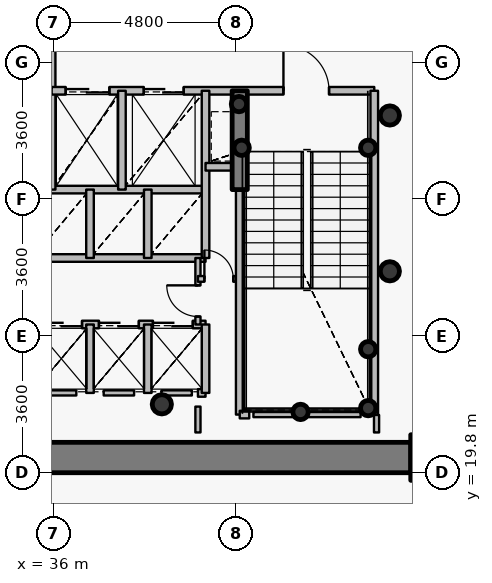
"""IFC4 building model, lengths in metres.
Left out: names, types, materials, properties, quantities, classifications, styles, units other than length and angle.
Written with IfcOpenShell. Run it as: python <this file> out.ifc"""

import sys

from ifc_helpers import new_model, si_unit, direction, frame, frame_2d, origin, origin_2d, place, context, subcontext, project, spatial, rectangle, hollow_circle, extrude, source, transform, mapped, element, fill, save


model = new_model("IFC4")
c1 = context("Model", 3, precision=1e-05, world=origin(), true_north=direction((0.0, 1.0)))
c2 = subcontext(c1, "Body", "Model", "MODEL_VIEW")
j1 = project(units=[si_unit("LENGTHUNIT", "METRE"), si_unit("PLANEANGLEUNIT", "RADIAN")], contexts=[c1])
p1 = place(None, origin())
s1 = spatial("IfcSite", under=j1, at=p1, CompositionType="ELEMENT")
p2 = place(p1, origin())
s2 = spatial("IfcBuilding", under=s1, at=p2, CompositionType="ELEMENT")
p3 = place(p2, frame((0.0, 0.0, 100.95)))
s3 = spatial("IfcBuildingStorey", under=s2, at=p3, CompositionType="ELEMENT", Elevation=100.95)
p4 = place(p3, frame((46.0, 20.2, 0.0), z_axis=(0.0, 0.0, 1.0), x_axis=(1.0, 0.0, 0.0)))
e1 = element("IfcColumn", 1, at=p4, inside=s3, PredefinedType="COLUMN", context=c2, shape_type="SweptSolid", body=[
    extrude(rectangle(XDim=1.2, YDim=1.2, at=origin_2d()), origin(), (0.0, 0.0, 1.0), 3.75),
])
p5 = place(p3, frame((38.85, 21.6, 0.0), z_axis=(0.0, 0.0, 1.0), x_axis=(1.0, 0.0, 0.0)))
e2 = element("IfcColumn", 2, at=p5, inside=s3, PredefinedType="COLUMN", context=c2, shape_type="SweptSolid", body=[
    extrude(hollow_circle(Radius=0.254, WallThickness=0.02, at=origin_2d()), origin(), (0.0, 0.0, 1.0), 3.75),
])
for number, where, z_axis, x_axis in (
    (3, (44.28, 21.5, 0.0), (0.0, 0.0, 1.0), (1.0, 0.0, 0.0)),
    (4, (44.28, 23.05, 0.0), (0.0, 0.0, 1.0), (1.0, 0.0, 0.0)),
    (5, (42.5, 21.4, 0.0), (0.0, 0.0, 1.0), (1.0, 0.0, 0.0)),
    (6, (40.95, 28.35, 0.0), (0.0, 0.0, 1.0), (1.0, 0.0, 0.0)),
    (7, (44.28, 28.35, 0.0), (0.0, 0.0, 1.0), (1.0, 0.0, 0.0)),
    (8, (40.88, 29.5, 0.0), (0.0, 0.0, 1.0), (1.0, 0.0, 0.0)),
):
    element("IfcColumn", number, at=place(p3, frame(where, z_axis=z_axis, x_axis=x_axis)), inside=s3, PredefinedType="COLUMN", context=c2, shape_type="SweptSolid", body=[
        extrude(hollow_circle(Radius=0.203, WallThickness=0.016, at=origin_2d()), origin(), (0.0, 0.0, 1.0), 3.75),
    ])
p6 = place(p3, frame((45.4, 20.2, 0.0), z_axis=(0.0, 0.0, 1.0), x_axis=(-1.0, 0.0, 0.0)))
e9 = element("IfcWall", 9, at=p6, inside=s3, PredefinedType="SHEAR", context=c2, shape_type="SweptSolid", body=[
    extrude(rectangle(XDim=18.8, YDim=0.8, at=frame_2d((9.4, 0.0))), origin(), (0.0, 0.0, 1.0), 2.95),
])
p7 = place(p6, frame((10.15, 0.0, 0.0)))
e10 = element("IfcOpeningElement", 10, at=p7, cuts=e9, PredefinedType="OPENING", context=c2, shape_type="SweptSolid", body=[
    extrude(rectangle(XDim=1.15, YDim=2.15, at=origin_2d()), frame((0.575, 0.41, 1.075), z_axis=(0.0, -1.0, 0.0), x_axis=(1.0, 0.0, 0.0)), (0.0, 0.0, 1.0), 0.82),
])
p8 = place(p3, frame((40.9, 27.25, 0.0), z_axis=(0.0, 0.0, 1.0), x_axis=(0.0, 1.0, 0.0)))
e11 = element("IfcWall", 11, at=p8, inside=s3, PredefinedType="SHEAR", context=c2, shape_type="SweptSolid", body=[
    extrude(rectangle(XDim=2.6, YDim=0.4, at=frame_2d((1.3, 0.0))), origin(), (0.0, 0.0, 1.0), 3.1),
])
for number, where, z_axis, x_axis in (
    (12, (44.85, 25.1, 0.0), (0.0, 0.0, 1.0), (1.0, 0.0, 0.0)),
    (13, (44.85, 29.2, 0.0), (0.0, 0.0, 1.0), (1.0, 0.0, 0.0)),
):
    element("IfcColumn", number, at=place(p3, frame(where, z_axis=z_axis, x_axis=x_axis)), inside=s3, PredefinedType="COLUMN", context=c2, shape_type="SweptSolid", body=[
        extrude(hollow_circle(Radius=0.254, WallThickness=0.02, at=origin_2d()), origin(), (0.0, 0.0, 1.0), 3.75),
    ])
p9 = place(p3, frame((35.05, 27.25, 0.0), z_axis=(0.0, 0.0, 1.0), x_axis=(1.0, 0.0, 0.0)))
e14 = element("IfcWall", 14, at=p9, inside=s3, PredefinedType="PARTITIONING", context=c2, shape_type="SweptSolid", body=[
    extrude(rectangle(XDim=4.95, YDim=0.2, at=frame_2d((2.475, 0.0))), origin(), (0.0, 0.0, 1.0), 3.085),
])
p10 = place(p3, frame((35.45, 23.7, 0.0), z_axis=(0.0, 0.0, 1.0), x_axis=(1.0, 0.0, 0.0)))
e15 = element("IfcWall", 15, at=p10, inside=s3, PredefinedType="PARTITIONING", context=c2, shape_type="SweptSolid", body=[
    extrude(rectangle(XDim=4.55, YDim=0.2, at=frame_2d((2.275, 0.0))), origin(), (0.0, 0.0, 1.0), 3.085),
])
p11 = place(p10, frame((0.25, 0.0, 0.0)))
e16 = element("IfcOpeningElement", 16, at=p11, cuts=e15, PredefinedType="OPENING", context=c2, shape_type="SweptSolid", body=[
    extrude(rectangle(XDim=1.05, YDim=2.15, at=origin_2d()), frame((0.525, 0.11, 1.075), z_axis=(0.0, -1.0, 0.0), x_axis=(1.0, 0.0, 0.0)), (0.0, 0.0, 1.0), 0.22),
])
p12 = place(p10, frame((1.745, 0.0, 0.0)))
e17 = element("IfcOpeningElement", 17, at=p12, cuts=e15, PredefinedType="OPENING", context=c2, shape_type="SweptSolid", body=[
    extrude(rectangle(XDim=1.05, YDim=2.15, at=origin_2d()), frame((0.525, 0.11, 1.075), z_axis=(0.0, -1.0, 0.0), x_axis=(1.0, 0.0, 0.0)), (0.0, 0.0, 1.0), 0.22),
])
p13 = place(p10, frame((3.165, 0.0, 0.0)))
e18 = element("IfcOpeningElement", 18, at=p13, cuts=e15, PredefinedType="OPENING", context=c2, shape_type="SweptSolid", body=[
    extrude(rectangle(XDim=1.05, YDim=2.15, at=origin_2d()), frame((0.525, 0.11, 1.075), z_axis=(0.0, -1.0, 0.0), x_axis=(1.0, 0.0, 0.0)), (0.0, 0.0, 1.0), 0.22),
])
p14 = place(p3, frame((35.45, 25.45, 0.0), z_axis=(0.0, 0.0, 1.0), x_axis=(1.0, 0.0, 0.0)))
e19 = element("IfcWall", 19, at=p14, inside=s3, PredefinedType="PARTITIONING", context=c2, shape_type="SweptSolid", body=[
    extrude(rectangle(XDim=4.55, YDim=0.2, at=frame_2d((2.275, 0.0))), origin(), (0.0, 0.0, 1.0), 3.085),
])
p15 = place(p3, frame((35.95, 27.25, 0.0), z_axis=(0.0, 0.0, 1.0), x_axis=(0.0, 1.0, 0.0)))
e20 = element("IfcWall", 20, at=p15, inside=s3, PredefinedType="PARTITIONING", context=c2, shape_type="SweptSolid", body=[
    extrude(rectangle(XDim=3.8, YDim=0.2, at=frame_2d((1.9, 0.0))), origin(), (0.0, 0.0, 1.0), 3.5),
])
p16 = place(p3, frame((35.95, 29.85, 0.0), z_axis=(0.0, 0.0, 1.0), x_axis=(1.0, 0.0, 0.0)))
e21 = element("IfcWall", 21, at=p16, inside=s3, PredefinedType="PARTITIONING", context=c2, shape_type="SweptSolid", body=[
    extrude(rectangle(XDim=8.49, YDim=0.2, at=frame_2d((4.245, 0.0))), origin(), (0.0, 0.0, 1.0), 3.085),
])
p17 = place(p16, frame((6.1, 0.0, 0.0)))
e22 = element("IfcOpeningElement", 22, at=p17, cuts=e21, PredefinedType="OPENING", context=c2, shape_type="SweptSolid", body=[
    extrude(rectangle(XDim=1.2, YDim=2.15, at=origin_2d()), frame((0.6, 0.11, 1.075), z_axis=(0.0, -1.0, 0.0), x_axis=(1.0, 0.0, 0.0)), (0.0, 0.0, 1.0), 0.22),
])
p18 = place(p16, frame((0.37, 0.0, 0.0)))
e23 = element("IfcOpeningElement", 23, at=p18, cuts=e21, PredefinedType="OPENING", context=c2, shape_type="SweptSolid", body=[
    extrude(rectangle(XDim=1.15, YDim=2.15, at=origin_2d()), frame((0.575, 0.11, 1.075), z_axis=(0.0, -1.0, 0.0), x_axis=(1.0, 0.0, 0.0)), (0.0, 0.0, 1.0), 0.22),
])
p19 = place(p16, frame((2.425, 0.0, 0.0)))
e24 = element("IfcOpeningElement", 24, at=p19, cuts=e21, PredefinedType="OPENING", context=c2, shape_type="SweptSolid", body=[
    extrude(rectangle(XDim=1.05, YDim=2.15, at=origin_2d()), frame((0.525, 0.11, 1.075), z_axis=(0.0, -1.0, 0.0), x_axis=(1.0, 0.0, 0.0)), (0.0, 0.0, 1.0), 0.22),
])
for number, where, z_axis, x_axis in (
    (25, (36.96, 21.9, 0.0), (0.0, 0.0, 1.0), (0.0, 1.0, 0.0)),
    (26, (36.96, 25.45, 0.0), (0.0, 0.0, 1.0), (0.0, 1.0, 0.0)),
):
    element("IfcWall", number, at=place(p3, frame(where, z_axis=z_axis, x_axis=x_axis)), inside=s3, PredefinedType="PARTITIONING", context=c2, shape_type="SweptSolid", body=[
        extrude(rectangle(XDim=1.8, YDim=0.2, at=frame_2d((0.9, 0.0))), origin(), (0.0, 0.0, 1.0), 3.5),
    ])
p20 = place(p3, frame((37.8, 27.25, 0.0), z_axis=(0.0, 0.0, 1.0), x_axis=(0.0, 1.0, 0.0)))
e27 = element("IfcWall", 27, at=p20, inside=s3, PredefinedType="PARTITIONING", context=c2, shape_type="SweptSolid", body=[
    extrude(rectangle(XDim=2.6, YDim=0.2, at=frame_2d((1.3, 0.0))), origin(), (0.0, 0.0, 1.0), 3.5),
])
for number, where, z_axis, x_axis in (
    (28, (38.48, 21.9, 0.0), (0.0, 0.0, 1.0), (0.0, 1.0, 0.0)),
    (29, (38.48, 25.45, 0.0), (0.0, 0.0, 1.0), (0.0, 1.0, 0.0)),
):
    element("IfcWall", number, at=place(p3, frame(where, z_axis=z_axis, x_axis=x_axis)), inside=s3, PredefinedType="PARTITIONING", context=c2, shape_type="SweptSolid", body=[
        extrude(rectangle(XDim=1.8, YDim=0.2, at=frame_2d((0.9, 0.0))), origin(), (0.0, 0.0, 1.0), 3.5),
    ])
p21 = place(p3, frame((39.8, 21.9, 0.0), z_axis=(0.0, 0.0, 1.0), x_axis=(1.0, 0.0, 0.0)))
e30 = element("IfcWall", 30, at=p21, inside=s3, PredefinedType="PARTITIONING", context=c2, shape_type="SweptSolid", body=[
    extrude(rectangle(XDim=0.2, YDim=0.2, at=frame_2d((0.1, 0.0))), origin(), (0.0, 0.0, 1.0), 3.5),
])
p22 = place(p3, frame((39.8, 23.7, 0.0), z_axis=(0.0, 0.0, 1.0), x_axis=(0.0, 1.0, 0.0)))
e31 = element("IfcWall", 31, at=p22, inside=s3, PredefinedType="PARTITIONING", context=c2, shape_type="SweptSolid", body=[
    extrude(rectangle(XDim=1.75, YDim=0.135, at=frame_2d((0.875, 0.0))), origin(), (0.0, 0.0, 1.0), 3.5),
])
p23 = place(p22, frame((0.21, 0.0, 0.0)))
e32 = element("IfcOpeningElement", 32, at=p23, cuts=e31, PredefinedType="OPENING", context=c2, shape_type="SweptSolid", body=[
    extrude(rectangle(XDim=0.82, YDim=2.1, at=origin_2d()), frame((0.41, 0.078, 1.05), z_axis=(0.0, -1.0, 0.0), x_axis=(1.0, 0.0, 0.0)), (0.0, 0.0, 1.0), 0.155),
])
p24 = place(p3, frame((39.8, 24.9, 0.0), z_axis=(0.0, 0.0, 1.0), x_axis=(1.0, 0.0, 0.0)))
e33 = element("IfcWall", 33, at=p24, inside=s3, PredefinedType="PARTITIONING", context=c2, shape_type="SweptSolid", body=[
    extrude(rectangle(XDim=1.1, YDim=0.15, at=frame_2d((0.55, 0.0))), origin(), (0.0, 0.0, 1.0), 3.5),
])
p25 = place(p24, frame((0.17, 0.0, 0.0)))
e34 = element("IfcOpeningElement", 34, at=p25, cuts=e33, PredefinedType="OPENING", context=c2, shape_type="SweptSolid", body=[
    extrude(rectangle(XDim=0.76, YDim=2.1, at=origin_2d()), frame((0.38, 0.085, 1.05), z_axis=(0.0, -1.0, 0.0), x_axis=(1.0, 0.0, 0.0)), (0.0, 0.0, 1.0), 0.17),
])
p26 = place(p3, frame((40.0, 21.9, 0.0), z_axis=(0.0, 0.0, 1.0), x_axis=(0.0, 1.0, 0.0)))
e35 = element("IfcWall", 35, at=p26, inside=s3, PredefinedType="PARTITIONING", context=c2, shape_type="SweptSolid", body=[
    extrude(rectangle(XDim=1.8, YDim=0.2, at=frame_2d((0.9, 0.0))), origin(), (0.0, 0.0, 1.0), 3.5),
])
p27 = place(p3, frame((40.0, 25.45, 0.0), z_axis=(0.0, 0.0, 1.0), x_axis=(0.0, 1.0, 0.0)))
e36 = element("IfcWall", 36, at=p27, inside=s3, PredefinedType="PARTITIONING", context=c2, shape_type="SweptSolid", body=[
    extrude(rectangle(XDim=4.4, YDim=0.2, at=frame_2d((2.2, 0.0))), origin(), (0.0, 0.0, 1.0), 3.5),
])
p28 = place(p3, frame((40.0, 27.85, 0.0), z_axis=(0.0, 0.0, 1.0), x_axis=(1.0, 0.0, 0.0)))
e37 = element("IfcWall", 37, at=p28, inside=s3, PredefinedType="PARTITIONING", context=c2, shape_type="SweptSolid", body=[
    extrude(rectangle(XDim=0.9, YDim=0.2, at=frame_2d((0.45, 0.0))), origin(), (0.0, 0.0, 1.0), 3.5),
])
p29 = place(p3, frame((40.9, 21.33, 0.0), z_axis=(0.0, 0.0, 1.0), x_axis=(0.0, 1.0, 0.0)))
e38 = element("IfcWall", 38, at=p29, inside=s3, PredefinedType="PARTITIONING", context=c2, shape_type="SweptSolid", body=[
    extrude(rectangle(XDim=5.91, YDim=0.2, at=frame_2d((2.955, 0.0))), origin(), (0.0, 0.0, 1.0), 3.035),
])
p30 = place(p3, frame((40.9, 21.33, 0.0), z_axis=(0.0, 0.0, 1.0), x_axis=(1.0, 0.0, 0.0)))
e39 = element("IfcWall", 39, at=p30, inside=s3, PredefinedType="PARTITIONING", context=c2, shape_type="SweptSolid", body=[
    extrude(rectangle(XDim=0.25, YDim=0.2, at=frame_2d((0.125, 0.0))), origin(), (0.0, 0.0, 1.0), 3.035),
])
p31 = place(p3, frame((44.44, 21.33, 0.0), z_axis=(0.0, 0.0, 1.0), x_axis=(0.0, 1.0, 0.0)))
e40 = element("IfcWall", 40, at=p31, inside=s3, PredefinedType="PARTITIONING", context=c2, shape_type="SweptSolid", body=[
    extrude(rectangle(XDim=8.52, YDim=0.2, at=frame_2d((4.26, 0.0))), origin(), (0.0, 0.0, 1.0), 3.5),
])
p32 = place(p3, frame((44.08, 21.33, 0.0), z_axis=(0.0, 0.0, 1.0), x_axis=(-1.0, 0.0, 0.0)))
e41 = element("IfcWall", 41, at=p32, inside=s3, PredefinedType="PARTITIONING", context=c2, shape_type="SweptSolid", body=[
    extrude(rectangle(XDim=2.82, YDim=0.135, at=frame_2d((1.41, 0.0))), origin(), (0.0, 0.0, 1.0), 3.035),
])
p33 = place(p3, frame((36.6, 21.9, 0.0), z_axis=(0.0, 0.0, 1.0), x_axis=(-1.0, 0.0, 0.0)))
e42 = element("IfcWall", 42, at=p33, inside=s3, PredefinedType="PARTITIONING", context=c2, shape_type="SweptSolid", body=[
    extrude(rectangle(XDim=0.79, YDim=0.135, at=frame_2d((0.395, 0.0))), origin(), (0.0, 0.0, 1.0), 3.5),
])
p34 = place(p3, frame((38.12, 21.9, 0.0), z_axis=(0.0, 0.0, 1.0), x_axis=(-1.0, 0.0, 0.0)))
e43 = element("IfcWall", 43, at=p34, inside=s3, PredefinedType="PARTITIONING", context=c2, shape_type="SweptSolid", body=[
    extrude(rectangle(XDim=0.8, YDim=0.135, at=frame_2d((0.4, 0.0))), origin(), (0.0, 0.0, 1.0), 3.5),
])
p35 = place(p3, frame((39.64, 21.9, 0.0), z_axis=(0.0, 0.0, 1.0), x_axis=(-1.0, 0.0, 0.0)))
e44 = element("IfcWall", 44, at=p35, inside=s3, PredefinedType="PARTITIONING", context=c2, shape_type="SweptSolid", body=[
    extrude(rectangle(XDim=0.8, YDim=0.135, at=frame_2d((0.4, 0.0))), origin(), (0.0, 0.0, 1.0), 3.085),
])
p36 = place(p3, frame((39.8, 20.86, 0.0), z_axis=(0.0, 0.0, 1.0), x_axis=(0.0, 1.0, 0.0)))
e45 = element("IfcWall", 45, at=p36, inside=s3, PredefinedType="PARTITIONING", context=c2, shape_type="SweptSolid", body=[
    extrude(rectangle(XDim=0.68, YDim=0.135, at=frame_2d((0.34, 0.0))), origin(), (0.0, 0.0, 1.0), 3.035),
])
p37 = place(p3, frame((44.5, 20.86, 0.0), z_axis=(0.0, 0.0, 1.0), x_axis=(0.0, 1.0, 0.0)))
e46 = element("IfcWall", 46, at=p37, inside=s3, PredefinedType="PARTITIONING", context=c2, shape_type="SweptSolid", body=[
    extrude(rectangle(XDim=0.46, YDim=0.135, at=frame_2d((0.23, 0.0))), origin(), (0.0, 0.0, 1.0), 3.5),
])
p38 = place(p3, frame((45.41, 19.8, 0.0), z_axis=(0.0, 0.0, 1.0), x_axis=(1.0, 0.0, 0.0)))
e47 = element("IfcWall", 47, at=p38, inside=s3, PredefinedType="PARTITIONING", context=c2, shape_type="SweptSolid", body=[
    extrude(rectangle(XDim=0.99, YDim=0.135, at=frame_2d((0.495, 0.0))), origin(), (0.0, 0.0, 1.0), 2.935),
])
m1 = source(origin(), c2, "Body", "SweptSolid", [
    extrude(rectangle(XDim=1.2, YDim=2.15, at=origin_2d()), frame((0.6, 0.025, 1.075), z_axis=(0.0, -1.0, 0.0), x_axis=(1.0, 0.0, 0.0)), (0.0, 0.0, 1.0), 0.05),
])
p39 = place(p17, origin())
e48 = element("IfcDoor", 48, at=p39, inside=s3, OperationType="SINGLE_SWING_LEFT", PredefinedType="DOOR", context=c2, shape_type="MappedRepresentation", body=[
    mapped(m1, transform((0.0, 0.0, 0.0), x_axis=(1.0, 0.0, 0.0), y_axis=(0.0, 1.0, 0.0), z_axis=(0.0, 0.0, 1.0), scale=1.0)),
])
fill(e22, e48)
m2 = source(origin(), c2, "Body", "SweptSolid", [
    extrude(rectangle(XDim=1.15, YDim=2.15, at=origin_2d()), frame((0.575, 0.025, 1.075), z_axis=(0.0, -1.0, 0.0), x_axis=(1.0, 0.0, 0.0)), (0.0, 0.0, 1.0), 0.05),
])
p40 = place(p18, origin())
e49 = element("IfcDoor", 49, at=p40, inside=s3, OperationType="DOUBLE_DOOR_SLIDING", PredefinedType="USERDEFINED", context=c2, shape_type="MappedRepresentation", body=[
    mapped(m2, transform((0.0, 0.0, 0.0), x_axis=(1.0, 0.0, 0.0), y_axis=(0.0, 1.0, 0.0), z_axis=(0.0, 0.0, 1.0), scale=1.0)),
])
fill(e23, e49)
m3 = source(origin(), c2, "Body", "SweptSolid", [
    extrude(rectangle(XDim=1.05, YDim=2.15, at=origin_2d()), frame((0.525, 0.025, 1.075), z_axis=(0.0, -1.0, 0.0), x_axis=(1.0, 0.0, 0.0)), (0.0, 0.0, 1.0), 0.05),
])
p41 = place(p19, origin())
e50 = element("IfcDoor", 50, at=p41, inside=s3, OperationType="DOUBLE_DOOR_SLIDING", PredefinedType="USERDEFINED", context=c2, shape_type="MappedRepresentation", body=[
    mapped(m3, transform((0.0, 0.0, 0.0), x_axis=(1.0, 0.0, 0.0), y_axis=(0.0, 1.0, 0.0), z_axis=(0.0, 0.0, 1.0), scale=1.0)),
])
fill(e24, e50)
p42 = place(p11, origin())
e51 = element("IfcDoor", 51, at=p42, inside=s3, OperationType="DOUBLE_DOOR_SLIDING", PredefinedType="USERDEFINED", context=c2, shape_type="MappedRepresentation", body=[
    mapped(m3, transform((0.0, 0.0, 0.0), x_axis=(1.0, 0.0, 0.0), y_axis=(0.0, 1.0, 0.0), z_axis=(0.0, 0.0, 1.0), scale=1.0)),
])
fill(e16, e51)
p43 = place(p12, origin())
e52 = element("IfcDoor", 52, at=p43, inside=s3, OperationType="DOUBLE_DOOR_SLIDING", PredefinedType="USERDEFINED", context=c2, shape_type="MappedRepresentation", body=[
    mapped(m3, transform((0.0, 0.0, 0.0), x_axis=(1.0, 0.0, 0.0), y_axis=(0.0, 1.0, 0.0), z_axis=(0.0, 0.0, 1.0), scale=1.0)),
])
fill(e17, e52)
p44 = place(p13, origin())
e53 = element("IfcDoor", 53, at=p44, inside=s3, OperationType="DOUBLE_DOOR_SLIDING", PredefinedType="USERDEFINED", context=c2, shape_type="MappedRepresentation", body=[
    mapped(m3, transform((0.0, 0.0, 0.0), x_axis=(1.0, 0.0, 0.0), y_axis=(0.0, 1.0, 0.0), z_axis=(0.0, 0.0, 1.0), scale=1.0)),
])
fill(e18, e53)
m4 = source(origin(), c2, "Body", "SweptSolid", [
    extrude(rectangle(XDim=0.82, YDim=2.1, at=origin_2d()), frame((0.41, 0.025, 1.05), z_axis=(0.0, -1.0, 0.0), x_axis=(1.0, 0.0, 0.0)), (0.0, 0.0, 1.0), 0.05),
])
p45 = place(p23, origin())
e54 = element("IfcDoor", 54, at=p45, inside=s3, OperationType="SINGLE_SWING_RIGHT", PredefinedType="DOOR", context=c2, shape_type="MappedRepresentation", body=[
    mapped(m4, transform((0.0, 0.0, 0.0), x_axis=(1.0, 0.0, 0.0), y_axis=(0.0, 1.0, 0.0), z_axis=(0.0, 0.0, 1.0), scale=1.0)),
])
fill(e32, e54)
m5 = source(origin(), c2, "Body", "SweptSolid", [
    extrude(rectangle(XDim=0.76, YDim=2.1, at=origin_2d()), frame((0.38, 0.025, 1.05), z_axis=(0.0, -1.0, 0.0), x_axis=(1.0, 0.0, 0.0)), (0.0, 0.0, 1.0), 0.05),
])
p46 = place(p25, origin())
e55 = element("IfcDoor", 55, at=p46, inside=s3, OperationType="SINGLE_SWING_LEFT", PredefinedType="DOOR", context=c2, shape_type="MappedRepresentation", body=[
    mapped(m5, transform((0.0, 0.0, 0.0), x_axis=(1.0, 0.0, 0.0), y_axis=(0.0, 1.0, 0.0), z_axis=(0.0, 0.0, 1.0), scale=1.0)),
])
fill(e34, e55)
save(model, sys.argv[1])
